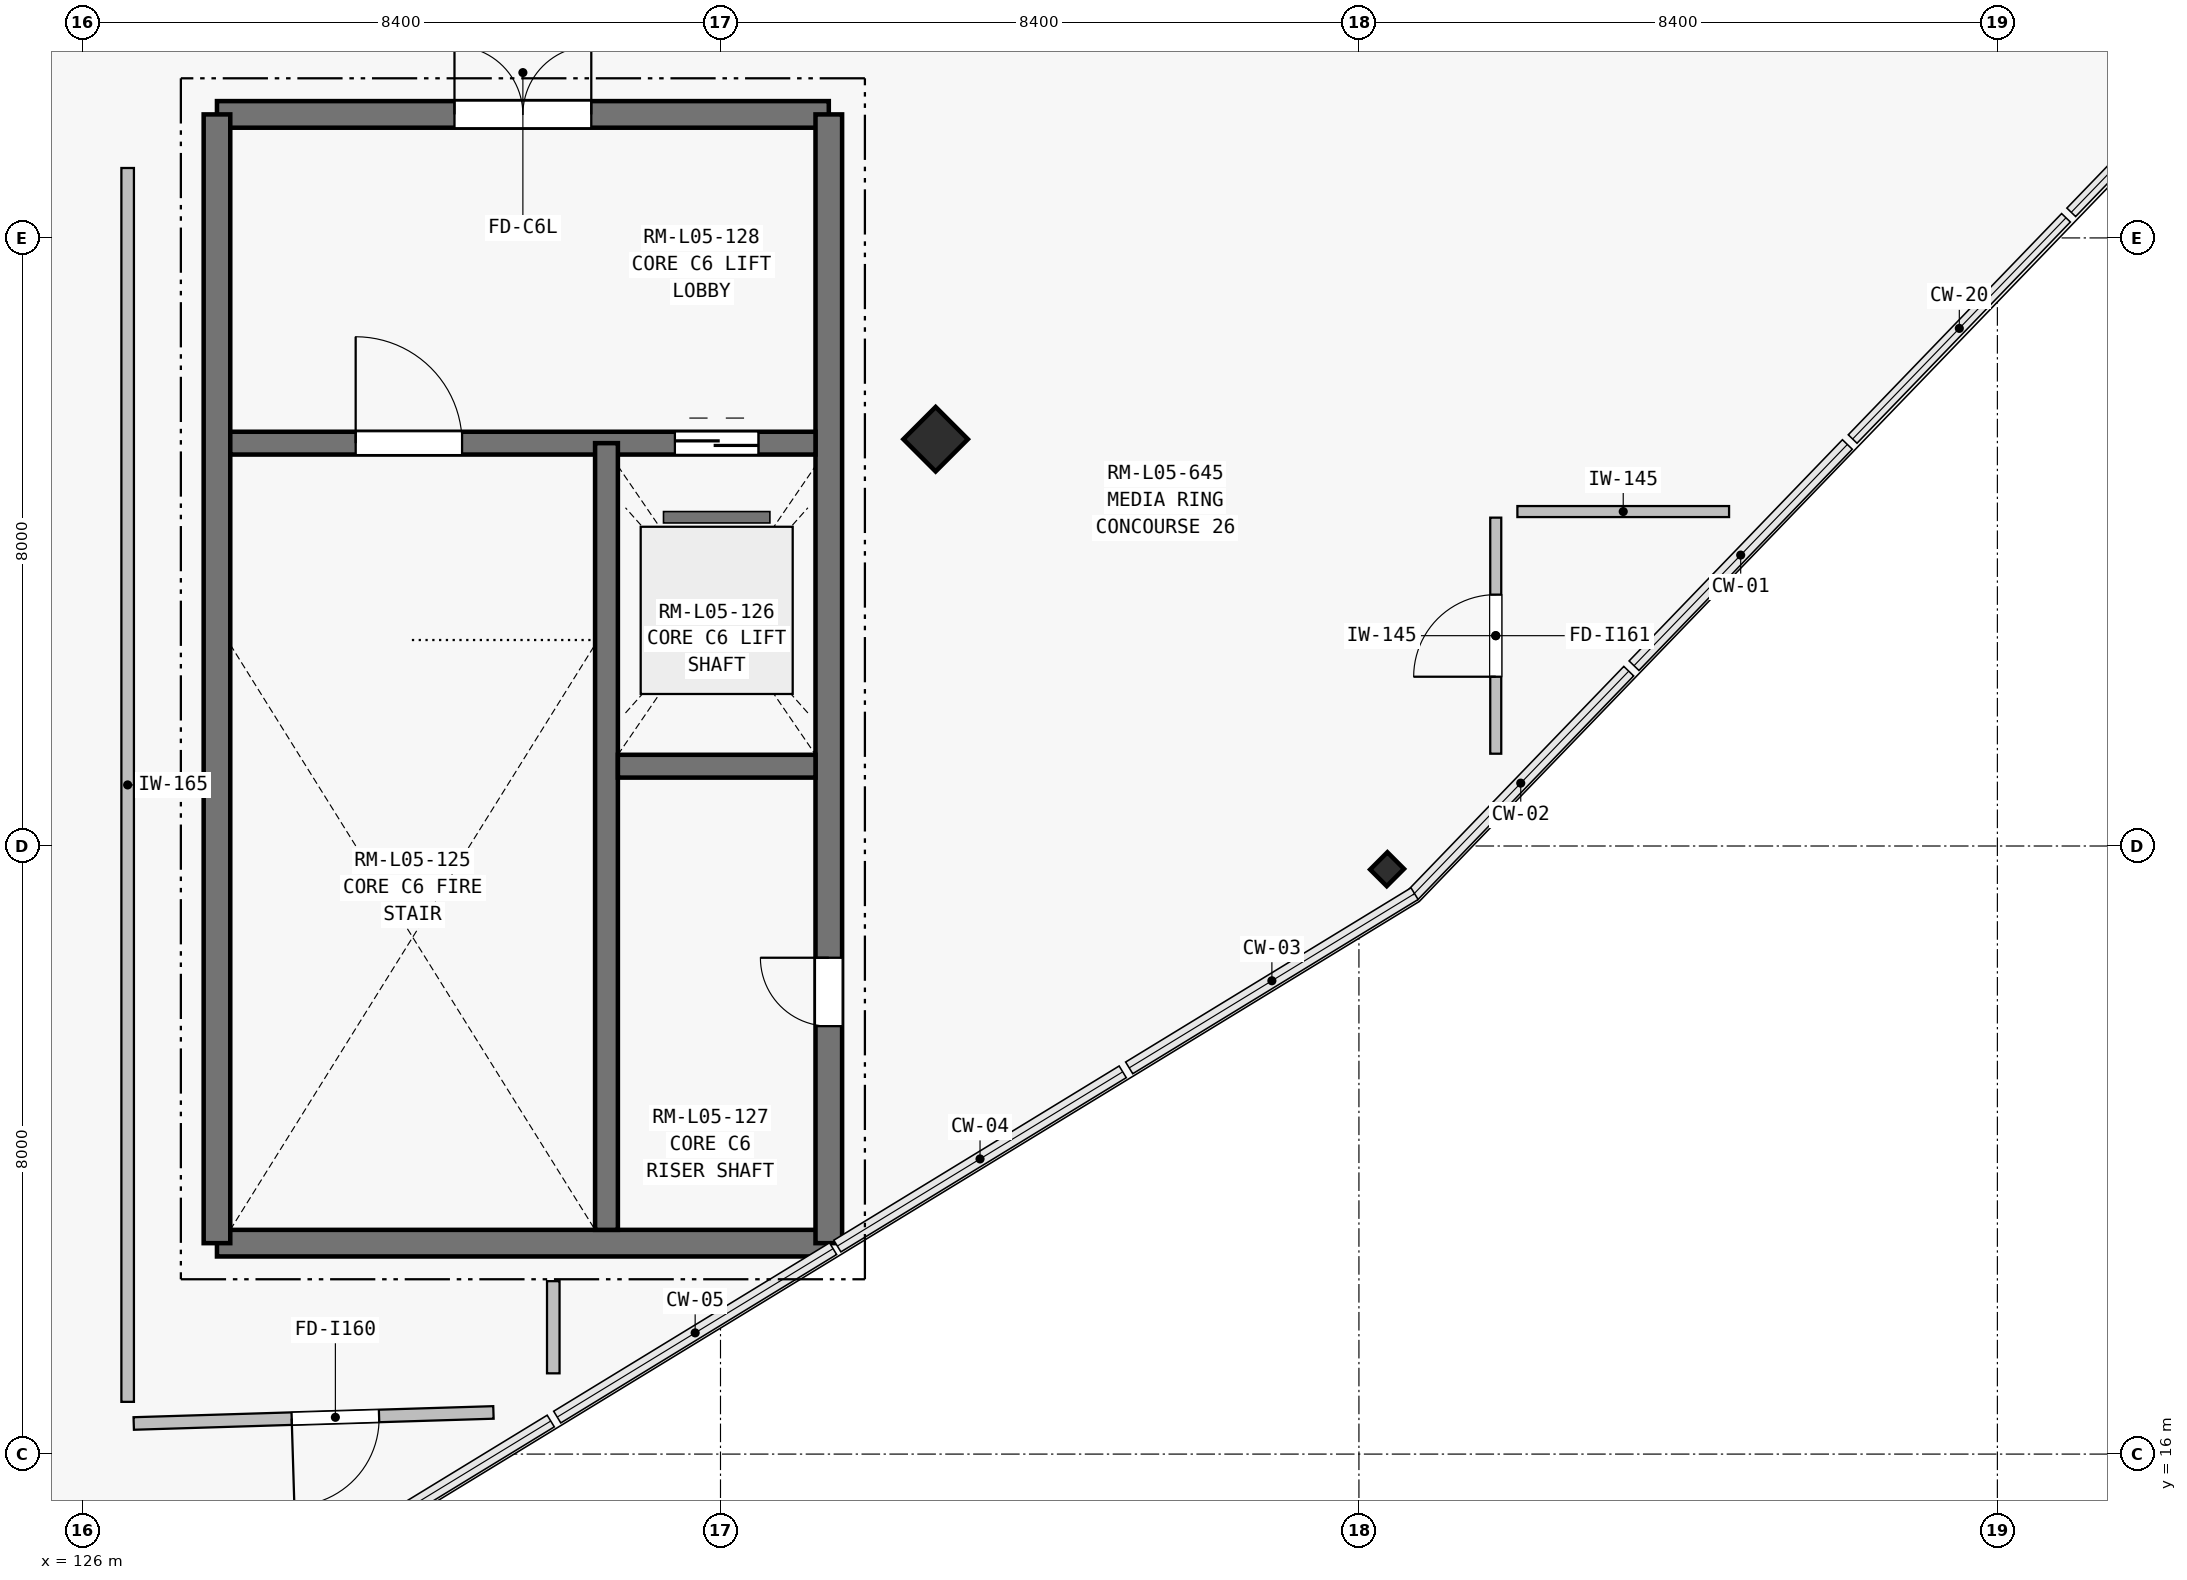
"""IFC4 building model, lengths in metres.
Left out: names, types, materials, properties, quantities, classifications, styles, units other than length and angle.
Written with IfcOpenShell. Run it as: python <this file> out.ifc"""

import sys

from ifc_helpers import new_model, si_unit, direction, frame, frame_2d, origin, origin_2d, place, context, subcontext, project, spatial, rectangle, i_section, extrude, element, fill, save


model = new_model("IFC4")
c1 = context("Model", 3, precision=1e-05, world=origin(), true_north=direction((0.0, 1.0)))
c2 = subcontext(c1, "Body", "Model", "MODEL_VIEW")
j1 = project(units=[si_unit("LENGTHUNIT", "METRE"), si_unit("PLANEANGLEUNIT", "RADIAN")], contexts=[c1])
p1 = place(None, origin())
s1 = spatial("IfcSite", under=j1, at=p1, CompositionType="ELEMENT")
p2 = place(p1, origin())
s2 = spatial("IfcBuilding", under=s1, at=p2, CompositionType="ELEMENT")
p3 = place(p2, frame((0.0, 0.0, 23.4)))
s3 = spatial("IfcBuildingStorey", under=s2, at=p3, CompositionType="ELEMENT", Elevation=23.4)
p4 = place(p3, frame((137.231, 29.352, 0.0), z_axis=(0.0, 0.0, 1.0), x_axis=(0.707106781187, -0.707106781187, 0.0)))
e1 = element("IfcColumn", 1, at=p4, inside=s3, PredefinedType="COLUMN", context=c2, shape_type="SweptSolid", body=[
    extrude(rectangle(XDim=0.6, YDim=0.6, at=origin_2d()), origin(), (0.0, 0.0, 1.0), 3.15),
])
p5 = place(p3, frame((143.17, 23.695, 0.0), z_axis=(0.0, 0.0, 1.0), x_axis=(0.707106781187, -0.707106781187, 0.0)))
e2 = element("IfcColumn", 2, at=p5, inside=s3, PredefinedType="COLUMN", context=c2, shape_type="SweptSolid", body=[
    extrude(i_section(OverallWidth=0.309, OverallDepth=0.321, WebThickness=0.014, FlangeThickness=0.022, at=origin_2d()), origin(), (0.0, 0.0, 1.0), 3.32),
])
p6 = place(p3, frame((127.775, 18.775, 0.0), z_axis=(0.0, 0.0, 1.0), x_axis=(1.0, 0.0, 0.0)))
e3 = element("IfcWall", 3, at=p6, inside=s3, PredefinedType="SHEAR", context=c2, shape_type="SweptSolid", body=[
    extrude(rectangle(XDim=8.05, YDim=0.35, at=frame_2d((4.025, 0.0))), origin(), (0.0, 0.0, 1.0), 3.08),
])
p7 = place(p3, frame((127.775, 33.625, 0.0), z_axis=(0.0, 0.0, 1.0), x_axis=(1.0, 0.0, 0.0)))
e4 = element("IfcWall", 4, at=p7, inside=s3, PredefinedType="SHEAR", context=c2, shape_type="SweptSolid", body=[
    extrude(rectangle(XDim=8.05, YDim=0.35, at=frame_2d((4.025, 0.0))), origin(), (0.0, 0.0, 1.0), 3.08),
])
p8 = place(p7, frame((3.125, 0.0, 0.0)))
e5 = element("IfcOpeningElement", 5, at=p8, cuts=e4, PredefinedType="OPENING", context=c2, shape_type="SweptSolid", body=[
    extrude(rectangle(XDim=1.8, YDim=2.25, at=frame_2d((0.9, 1.125))), frame((0.0, 0.185, 0.0), z_axis=(0.0, -1.0, 0.0), x_axis=(1.0, 0.0, 0.0)), (0.0, 0.0, 1.0), 0.37),
])
p9 = place(p3, frame((127.775, 18.775, 0.0), z_axis=(0.0, 0.0, 1.0), x_axis=(0.0, 1.0, 0.0)))
e6 = element("IfcWall", 6, at=p9, inside=s3, PredefinedType="SHEAR", context=c2, shape_type="SweptSolid", body=[
    extrude(rectangle(XDim=14.85, YDim=0.35, at=frame_2d((7.425, 0.0))), origin(), (0.0, 0.0, 1.0), 3.08),
])
p10 = place(p3, frame((135.825, 18.775, 0.0), z_axis=(0.0, 0.0, 1.0), x_axis=(0.0, 1.0, 0.0)))
e7 = element("IfcWall", 7, at=p10, inside=s3, PredefinedType="SHEAR", context=c2, shape_type="SweptSolid", body=[
    extrude(rectangle(XDim=14.85, YDim=0.35, at=frame_2d((7.425, 0.0))), origin(), (0.0, 0.0, 1.0), 3.08),
])
p11 = place(p10, frame((2.855, 0.0, 0.0)))
e8 = element("IfcOpeningElement", 8, at=p11, cuts=e7, PredefinedType="OPENING", context=c2, shape_type="SweptSolid", body=[
    extrude(rectangle(XDim=0.9, YDim=2.1, at=frame_2d((0.45, 1.05))), frame((0.0, 0.185, 0.0), z_axis=(0.0, -1.0, 0.0), x_axis=(1.0, 0.0, 0.0)), (0.0, 0.0, 1.0), 0.37),
])
p12 = place(p3, frame((127.95, 29.3, 0.0), z_axis=(0.0, 0.0, 1.0), x_axis=(1.0, 0.0, 0.0)))
e9 = element("IfcWall", 9, at=p12, inside=s3, PredefinedType="SHEAR", context=c2, shape_type="SweptSolid", body=[
    extrude(rectangle(XDim=7.7, YDim=0.3, at=frame_2d((3.85, 0.0))), origin(), (0.0, 0.0, 1.0), 3.08),
])
p13 = place(p12, frame((1.65, 0.0, 0.0)))
e10 = element("IfcOpeningElement", 10, at=p13, cuts=e9, PredefinedType="OPENING", context=c2, shape_type="SweptSolid", body=[
    extrude(rectangle(XDim=1.4, YDim=2.2, at=frame_2d((0.7, 1.1))), frame((0.0, 0.16, 0.0), z_axis=(0.0, -1.0, 0.0), x_axis=(1.0, 0.0, 0.0)), (0.0, 0.0, 1.0), 0.32),
])
p14 = place(p12, frame((5.85, 0.0, 0.0)))
e11 = element("IfcOpeningElement", 11, at=p14, cuts=e9, PredefinedType="OPENING", context=c2, shape_type="SweptSolid", body=[
    extrude(rectangle(XDim=1.1, YDim=2.2, at=frame_2d((0.55, 1.1))), frame((0.0, 0.16, 0.0), z_axis=(0.0, -1.0, 0.0), x_axis=(1.0, 0.0, 0.0)), (0.0, 0.0, 1.0), 0.32),
])
p15 = place(p3, frame((132.9, 18.95, 0.0), z_axis=(0.0, 0.0, 1.0), x_axis=(0.0, 1.0, 0.0)))
e12 = element("IfcWall", 12, at=p15, inside=s3, PredefinedType="SHEAR", context=c2, shape_type="SweptSolid", body=[
    extrude(rectangle(XDim=10.35, YDim=0.3, at=frame_2d((5.175, 0.0))), origin(), (0.0, 0.0, 1.0), 3.08),
])
p16 = place(p3, frame((133.05, 25.05, 0.0), z_axis=(0.0, 0.0, 1.0), x_axis=(1.0, 0.0, 0.0)))
e13 = element("IfcWall", 13, at=p16, inside=s3, PredefinedType="SHEAR", context=c2, shape_type="SweptSolid", body=[
    extrude(rectangle(XDim=2.6, YDim=0.3, at=frame_2d((1.3, 0.0))), origin(), (0.0, 0.0, 1.0), 3.08),
])
p17 = place(p3, frame((132.2, 18.275, 0.0), z_axis=(0.0, 0.0, 1.0), x_axis=(0.0, -1.0, 0.0)))
e14 = element("IfcWall", 14, at=p17, inside=s3, PredefinedType="PARTITIONING", context=c2, shape_type="SweptSolid", body=[
    extrude(rectangle(XDim=1.212, YDim=0.165, at=frame_2d((0.606, 0.0))), origin(), (0.0, 0.0, 1.0), 2.5),
])
p18 = place(p3, frame((131.413, 16.548, 0.0), z_axis=(0.0, 0.0, 1.0), x_axis=(-0.999527694341, -0.030730900481, 0.0)))
e15 = element("IfcWall", 15, at=p18, inside=s3, PredefinedType="PARTITIONING", context=c2, shape_type="SweptSolid", body=[
    extrude(rectangle(XDim=4.735, YDim=0.165, at=frame_2d((2.367, 0.0))), origin(), (0.0, 0.0, 1.0), 2.5),
])
p19 = place(p18, frame((1.506, 0.0, 0.0)))
e16 = element("IfcOpeningElement", 16, at=p19, cuts=e15, PredefinedType="OPENING", context=c2, shape_type="SweptSolid", body=[
    extrude(rectangle(XDim=1.15, YDim=2.2, at=frame_2d((0.575, 1.1))), frame((0.0, 0.093, 0.0), z_axis=(0.0, -1.0, 0.0), x_axis=(1.0, 0.0, 0.0)), (0.0, 0.0, 1.0), 0.185),
])
p20 = place(p3, frame((126.6, 16.687, 0.0), z_axis=(0.0, 0.0, 1.0), x_axis=(0.0, 1.0, 0.0)))
e17 = element("IfcWall", 17, at=p20, inside=s3, PredefinedType="PARTITIONING", context=c2, shape_type="SweptSolid", body=[
    extrude(rectangle(XDim=16.233, YDim=0.165, at=frame_2d((8.116, 0.0))), origin(), (0.0, 0.0, 1.0), 2.445),
])
p21 = place(p3, frame((144.6, 25.214, 0.0), z_axis=(0.0, 0.0, 1.0), x_axis=(0.0, 1.0, 0.0)))
e18 = element("IfcWall", 18, at=p21, inside=s3, PredefinedType="PARTITIONING", context=c2, shape_type="SweptSolid", body=[
    extrude(rectangle(XDim=3.106, YDim=0.145, at=frame_2d((1.553, 0.0))), origin(), (0.0, 0.0, 1.0), 2.5),
])
p22 = place(p21, frame((1.013, 0.0, 0.0)))
e19 = element("IfcOpeningElement", 19, at=p22, cuts=e18, PredefinedType="OPENING", context=c2, shape_type="SweptSolid", body=[
    extrude(rectangle(XDim=1.08, YDim=2.15, at=frame_2d((0.54, 1.075))), frame((0.0, 0.083, 0.0), z_axis=(0.0, -1.0, 0.0), x_axis=(1.0, 0.0, 0.0)), (0.0, 0.0, 1.0), 0.165),
])
p23 = place(p3, frame((144.885, 28.4, 0.0), z_axis=(0.0, 0.0, 1.0), x_axis=(1.0, 0.0, 0.0)))
e20 = element("IfcWall", 20, at=p23, inside=s3, PredefinedType="PARTITIONING", context=c2, shape_type="SweptSolid", body=[
    extrude(rectangle(XDim=2.785, YDim=0.145, at=frame_2d((1.393, 0.0))), origin(), (0.0, 0.0, 1.0), 2.5),
])
p24 = place(p8, origin())
e21 = element("IfcDoor", 21, at=p24, inside=s3, OperationType="DOUBLE_DOOR_SINGLE_SWING", PredefinedType="DOOR", context=c2, shape_type="SweptSolid", body=[
    extrude(rectangle(XDim=1.8, YDim=2.25, at=frame_2d((0.9, 1.125))), frame((0.0, 0.025, 0.0), z_axis=(0.0, -1.0, 0.0), x_axis=(1.0, 0.0, 0.0)), (0.0, 0.0, 1.0), 0.05),
])
fill(e5, e21)
p25 = place(p13, origin())
e22 = element("IfcDoor", 22, at=p25, inside=s3, OperationType="SINGLE_SWING_LEFT", PredefinedType="DOOR", context=c2, shape_type="SweptSolid", body=[
    extrude(rectangle(XDim=1.4, YDim=2.2, at=frame_2d((0.7, 1.1))), frame((0.0, 0.025, 0.0), z_axis=(0.0, -1.0, 0.0), x_axis=(1.0, 0.0, 0.0)), (0.0, 0.0, 1.0), 0.05),
])
fill(e10, e22)
p26 = place(p11, origin())
e23 = element("IfcDoor", 23, at=p26, inside=s3, OperationType="SINGLE_SWING_RIGHT", PredefinedType="DOOR", context=c2, shape_type="SweptSolid", body=[
    extrude(rectangle(XDim=0.9, YDim=2.1, at=frame_2d((0.45, 1.05))), frame((0.0, 0.025, 0.0), z_axis=(0.0, -1.0, 0.0), x_axis=(1.0, 0.0, 0.0)), (0.0, 0.0, 1.0), 0.05),
])
fill(e8, e23)
p27 = place(p14, origin())
e24 = element("IfcDoor", 24, at=p27, inside=s3, OperationType="SLIDING_TO_LEFT", PredefinedType="DOOR", context=c2, shape_type="SweptSolid", body=[
    extrude(rectangle(XDim=1.1, YDim=2.2, at=frame_2d((0.55, 1.1))), frame((0.0, 0.025, 0.0), z_axis=(0.0, -1.0, 0.0), x_axis=(1.0, 0.0, 0.0)), (0.0, 0.0, 1.0), 0.05),
])
fill(e11, e24)
p28 = place(p19, origin())
e25 = element("IfcDoor", 25, at=p28, inside=s3, OperationType="SINGLE_SWING_RIGHT", PredefinedType="DOOR", context=c2, shape_type="SweptSolid", body=[
    extrude(rectangle(XDim=1.15, YDim=2.2, at=frame_2d((0.575, 1.1))), frame((0.0, 0.025, 0.0), z_axis=(0.0, -1.0, 0.0), x_axis=(1.0, 0.0, 0.0)), (0.0, 0.0, 1.0), 0.05),
])
fill(e16, e25)
p29 = place(p22, origin())
e26 = element("IfcDoor", 26, at=p29, inside=s3, OperationType="SINGLE_SWING_LEFT", PredefinedType="DOOR", context=c2, shape_type="SweptSolid", body=[
    extrude(rectangle(XDim=1.08, YDim=2.15, at=frame_2d((0.54, 1.075))), frame((0.0, 0.025, 0.0), z_axis=(0.0, -1.0, 0.0), x_axis=(1.0, 0.0, 0.0)), (0.0, 0.0, 1.0), 0.05),
])
fill(e19, e26)
save(model, sys.argv[1])
